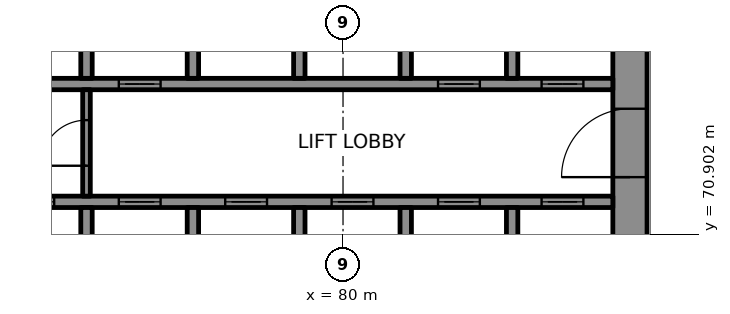
"""IFC4 building model, lengths in metres.
Left out: names, types, materials, properties, quantities, classifications, styles, units other than length and angle.
Written with IfcOpenShell. Run it as: python <this file> out.ifc"""

import sys

from ifc_helpers import new_model, si_unit, direction, frame, frame_2d, origin, place, context, subcontext, project, spatial, rectangle, extrude, element, fill, save


model = new_model("IFC4")
c1 = context("Model", 3, precision=1e-05, world=origin(), true_north=direction((0.0, 1.0)))
c2 = subcontext(c1, "Body", "Model", "MODEL_VIEW")
j1 = project(units=[si_unit("LENGTHUNIT", "METRE"), si_unit("PLANEANGLEUNIT", "RADIAN")], contexts=[c1])
p1 = place(None, origin())
s1 = spatial("IfcSite", under=j1, at=p1, CompositionType="ELEMENT")
p2 = place(p1, origin())
s2 = spatial("IfcBuilding", under=s1, at=p2, CompositionType="ELEMENT")
p3 = place(p2, frame((0.0, 0.0, 21.8)))
s3 = spatial("IfcBuildingStorey", under=s2, at=p3, CompositionType="ELEMENT", Elevation=21.8)
p4 = place(p3, frame((87.55, 66.9, 0.0), z_axis=(0.0, 0.0, 1.0), x_axis=(0.0, 1.0, 0.0)))
e1 = element("IfcWall", 1, at=p4, inside=s3, PredefinedType="SHEAR", context=c2, shape_type="SweptSolid", body=[
    extrude(rectangle(XDim=16.2, YDim=0.9, at=frame_2d((8.1, 0.0))), origin(), (0.0, 0.0, 1.0), 4.3),
])
p5 = place(p4, frame((5.5, 0.0, 0.0)))
e2 = element("IfcOpeningElement", 2, at=p5, cuts=e1, PredefinedType="OPENING", context=c2, shape_type="SweptSolid", body=[
    extrude(rectangle(XDim=1.8, YDim=2.1, at=frame_2d((0.9, 1.05))), frame((0.0, 0.46, 0.0), z_axis=(0.0, -1.0, 0.0), x_axis=(1.0, 0.0, 0.0)), (0.0, 0.0, 1.0), 0.92),
])
p6 = place(p4, frame((12.272, 0.0, 0.0)))
e3 = element("IfcOpeningElement", 3, at=p6, cuts=e1, PredefinedType="OPENING", context=c2, shape_type="SweptSolid", body=[
    extrude(rectangle(XDim=0.9, YDim=2.1, at=frame_2d((0.45, 1.05))), frame((0.0, 0.46, 0.0), z_axis=(0.0, -1.0, 0.0), x_axis=(1.0, 0.0, 0.0)), (0.0, 0.0, 1.0), 0.92),
])
p7 = place(p3, frame((70.3, 71.75, 0.0), z_axis=(0.0, 0.0, 1.0), x_axis=(1.0, 0.0, 0.0)))
e4 = element("IfcWall", 4, at=p7, inside=s3, PredefinedType="SHEAR", context=c2, shape_type="SweptSolid", body=[
    extrude(rectangle(XDim=16.8, YDim=0.3, at=frame_2d((8.4, 0.0))), origin(), (0.0, 0.0, 1.0), 4.3),
])
p8 = place(p7, frame((1.0, 0.0, 0.0)))
e5 = element("IfcOpeningElement", 5, at=p8, cuts=e4, PredefinedType="OPENING", context=c2, shape_type="SweptSolid", body=[
    extrude(rectangle(XDim=1.1, YDim=2.1, at=frame_2d((0.55, 1.05))), frame((0.0, 0.16, 0.0), z_axis=(0.0, -1.0, 0.0), x_axis=(1.0, 0.0, 0.0)), (0.0, 0.0, 1.0), 0.32),
])
p9 = place(p7, frame((3.8, 0.0, 0.0)))
e6 = element("IfcOpeningElement", 6, at=p9, cuts=e4, PredefinedType="OPENING", context=c2, shape_type="SweptSolid", body=[
    extrude(rectangle(XDim=1.1, YDim=2.1, at=frame_2d((0.55, 1.05))), frame((0.0, 0.16, 0.0), z_axis=(0.0, -1.0, 0.0), x_axis=(1.0, 0.0, 0.0)), (0.0, 0.0, 1.0), 0.32),
])
p10 = place(p7, frame((6.6, 0.0, 0.0)))
e7 = element("IfcOpeningElement", 7, at=p10, cuts=e4, PredefinedType="OPENING", context=c2, shape_type="SweptSolid", body=[
    extrude(rectangle(XDim=1.1, YDim=2.1, at=frame_2d((0.55, 1.05))), frame((0.0, 0.16, 0.0), z_axis=(0.0, -1.0, 0.0), x_axis=(1.0, 0.0, 0.0)), (0.0, 0.0, 1.0), 0.32),
])
p11 = place(p7, frame((9.4, 0.0, 0.0)))
e8 = element("IfcOpeningElement", 8, at=p11, cuts=e4, PredefinedType="OPENING", context=c2, shape_type="SweptSolid", body=[
    extrude(rectangle(XDim=1.1, YDim=2.1, at=frame_2d((0.55, 1.05))), frame((0.0, 0.16, 0.0), z_axis=(0.0, -1.0, 0.0), x_axis=(1.0, 0.0, 0.0)), (0.0, 0.0, 1.0), 0.32),
])
p12 = place(p7, frame((12.2, 0.0, 0.0)))
e9 = element("IfcOpeningElement", 9, at=p12, cuts=e4, PredefinedType="OPENING", context=c2, shape_type="SweptSolid", body=[
    extrude(rectangle(XDim=1.1, YDim=2.1, at=frame_2d((0.55, 1.05))), frame((0.0, 0.16, 0.0), z_axis=(0.0, -1.0, 0.0), x_axis=(1.0, 0.0, 0.0)), (0.0, 0.0, 1.0), 0.32),
])
p13 = place(p7, frame((14.925, 0.0, 0.0)))
e10 = element("IfcOpeningElement", 10, at=p13, cuts=e4, PredefinedType="OPENING", context=c2, shape_type="SweptSolid", body=[
    extrude(rectangle(XDim=1.1, YDim=2.1, at=frame_2d((0.55, 1.05))), frame((0.0, 0.16, 0.0), z_axis=(0.0, -1.0, 0.0), x_axis=(1.0, 0.0, 0.0)), (0.0, 0.0, 1.0), 0.32),
])
p14 = place(p3, frame((70.3, 74.85, 0.0), z_axis=(0.0, 0.0, 1.0), x_axis=(1.0, 0.0, 0.0)))
e11 = element("IfcWall", 11, at=p14, inside=s3, PredefinedType="SHEAR", context=c2, shape_type="SweptSolid", body=[
    extrude(rectangle(XDim=16.8, YDim=0.3, at=frame_2d((8.4, 0.0))), origin(), (0.0, 0.0, 1.0), 4.3),
])
p15 = place(p14, frame((3.8, 0.0, 0.0)))
e12 = element("IfcOpeningElement", 12, at=p15, cuts=e11, PredefinedType="OPENING", context=c2, shape_type="SweptSolid", body=[
    extrude(rectangle(XDim=1.1, YDim=2.1, at=frame_2d((0.55, 1.05))), frame((0.0, 0.16, 0.0), z_axis=(0.0, -1.0, 0.0), x_axis=(1.0, 0.0, 0.0)), (0.0, 0.0, 1.0), 0.32),
])
p16 = place(p14, frame((12.2, 0.0, 0.0)))
e13 = element("IfcOpeningElement", 13, at=p16, cuts=e11, PredefinedType="OPENING", context=c2, shape_type="SweptSolid", body=[
    extrude(rectangle(XDim=1.1, YDim=2.1, at=frame_2d((0.55, 1.05))), frame((0.0, 0.16, 0.0), z_axis=(0.0, -1.0, 0.0), x_axis=(1.0, 0.0, 0.0)), (0.0, 0.0, 1.0), 0.32),
])
p17 = place(p14, frame((14.925, 0.0, 0.0)))
e14 = element("IfcOpeningElement", 14, at=p17, cuts=e11, PredefinedType="OPENING", context=c2, shape_type="SweptSolid", body=[
    extrude(rectangle(XDim=1.1, YDim=2.1, at=frame_2d((0.55, 1.05))), frame((0.0, 0.16, 0.0), z_axis=(0.0, -1.0, 0.0), x_axis=(1.0, 0.0, 0.0)), (0.0, 0.0, 1.0), 0.32),
])
for number, where, z_axis, x_axis in (
    (15, (73.25, 69.0, 0.0), (0.0, 0.0, 1.0), (0.0, 1.0, 0.0)),
    (16, (73.25, 75.0, 0.0), (0.0, 0.0, 1.0), (0.0, 1.0, 0.0)),
    (17, (76.05, 69.0, 0.0), (0.0, 0.0, 1.0), (0.0, 1.0, 0.0)),
    (18, (76.05, 75.0, 0.0), (0.0, 0.0, 1.0), (0.0, 1.0, 0.0)),
    (19, (78.85, 69.0, 0.0), (0.0, 0.0, 1.0), (0.0, 1.0, 0.0)),
    (20, (78.85, 75.0, 0.0), (0.0, 0.0, 1.0), (0.0, 1.0, 0.0)),
    (21, (81.65, 69.0, 0.0), (0.0, 0.0, 1.0), (0.0, 1.0, 0.0)),
    (22, (81.65, 75.0, 0.0), (0.0, 0.0, 1.0), (0.0, 1.0, 0.0)),
    (23, (84.45, 69.0, 0.0), (0.0, 0.0, 1.0), (0.0, 1.0, 0.0)),
    (24, (84.45, 75.0, 0.0), (0.0, 0.0, 1.0), (0.0, 1.0, 0.0)),
):
    element("IfcWall", number, at=place(p3, frame(where, z_axis=z_axis, x_axis=x_axis)), inside=s3, PredefinedType="SHEAR", context=c2, shape_type="SweptSolid", body=[
        extrude(rectangle(XDim=2.6, YDim=0.3, at=frame_2d((1.3, 0.0))), origin(), (0.0, 0.0, 1.0), 4.3),
    ])
p18 = place(p3, frame((73.25, 71.9, 0.0), z_axis=(0.0, 0.0, 1.0), x_axis=(0.0, 1.0, 0.0)))
e25 = element("IfcWall", 25, at=p18, inside=s3, PredefinedType="PARTITIONING", context=c2, shape_type="SweptSolid", body=[
    extrude(rectangle(XDim=2.8, YDim=0.2, at=frame_2d((1.4, 0.0))), origin(), (0.0, 0.0, 1.0), 4.3),
])
p19 = place(p18, frame((0.8, 0.0, 0.0)))
e26 = element("IfcOpeningElement", 26, at=p19, cuts=e25, PredefinedType="OPENING", context=c2, shape_type="SweptSolid", body=[
    extrude(rectangle(XDim=1.2, YDim=2.1, at=frame_2d((0.6, 1.05))), frame((0.0, 0.11, 0.0), z_axis=(0.0, -1.0, 0.0), x_axis=(1.0, 0.0, 0.0)), (0.0, 0.0, 1.0), 0.22),
])
p20 = place(p3, frame((107.106, 62.36, 0.0), z_axis=(0.0, 0.0, 1.0), x_axis=(-0.49999992739, 0.866025445706, 0.0)))
e27 = element("IfcWall", 27, at=p20, inside=s3, PredefinedType="SOLIDWALL", context=c2, shape_type="SweptSolid", body=[
    extrude(rectangle(XDim=54.0, YDim=0.4, at=frame_2d((27.0, 0.0))), origin(), (0.0, 0.0, 1.0), 4.3),
])
p21 = place(p3, frame((112.496, 65.725, 0.0), z_axis=(0.0, 0.0, 1.0), x_axis=(-0.499998673217, 0.866026169802, 0.0)))
e28 = element("IfcWall", 28, at=p21, inside=s3, PredefinedType="PARTITIONING", context=c2, shape_type="SweptSolid", body=[
    extrude(rectangle(XDim=53.48, YDim=0.2, at=frame_2d((26.74, 0.0))), origin(), (0.0, 0.0, 1.0), 4.3),
])
p22 = place(p21, frame((13.08, 0.0, 0.0)))
e29 = element("IfcOpeningElement", 29, at=p22, cuts=e28, PredefinedType="OPENING", context=c2, shape_type="SweptSolid", body=[
    extrude(rectangle(XDim=1.0, YDim=2.1, at=frame_2d((0.5, 1.05))), frame((0.0, 0.11, 0.0), z_axis=(0.0, -1.0, 0.0), x_axis=(1.0, 0.0, 0.0)), (0.0, 0.0, 1.0), 0.22),
])
p23 = place(p21, frame((26.28, 0.0, 0.0)))
e30 = element("IfcOpeningElement", 30, at=p23, cuts=e28, PredefinedType="OPENING", context=c2, shape_type="SweptSolid", body=[
    extrude(rectangle(XDim=1.0, YDim=2.1, at=frame_2d((0.5, 1.05))), frame((0.0, 0.11, 0.0), z_axis=(0.0, -1.0, 0.0), x_axis=(1.0, 0.0, 0.0)), (0.0, 0.0, 1.0), 0.22),
])
p24 = place(p21, frame((43.88, 0.0, 0.0)))
e31 = element("IfcOpeningElement", 31, at=p24, cuts=e28, PredefinedType="OPENING", context=c2, shape_type="SweptSolid", body=[
    extrude(rectangle(XDim=1.0, YDim=2.1, at=frame_2d((0.5, 1.05))), frame((0.0, 0.11, 0.0), z_axis=(0.0, -1.0, 0.0), x_axis=(1.0, 0.0, 0.0)), (0.0, 0.0, 1.0), 0.22),
])
p25 = place(p21, frame((50.58, 0.0, 0.0)))
e32 = element("IfcOpeningElement", 32, at=p25, cuts=e28, PredefinedType="OPENING", context=c2, shape_type="SweptSolid", body=[
    extrude(rectangle(XDim=1.0, YDim=2.1, at=frame_2d((0.5, 1.05))), frame((0.0, 0.11, 0.0), z_axis=(0.0, -1.0, 0.0), x_axis=(1.0, 0.0, 0.0)), (0.0, 0.0, 1.0), 0.22),
])
p26 = place(p8, origin())
e33 = element("IfcDoor", 33, at=p26, inside=s3, OperationType="DOUBLE_DOOR_SLIDING", PredefinedType="DOOR", context=c2, shape_type="SweptSolid", body=[
    extrude(rectangle(XDim=1.1, YDim=2.1, at=frame_2d((0.55, 1.05))), frame((0.0, 0.025, 0.0), z_axis=(0.0, -1.0, 0.0), x_axis=(1.0, 0.0, 0.0)), (0.0, 0.0, 1.0), 0.05),
])
fill(e5, e33)
p27 = place(p9, origin())
e34 = element("IfcDoor", 34, at=p27, inside=s3, OperationType="DOUBLE_DOOR_SLIDING", PredefinedType="DOOR", context=c2, shape_type="SweptSolid", body=[
    extrude(rectangle(XDim=1.1, YDim=2.1, at=frame_2d((0.55, 1.05))), frame((0.0, 0.025, 0.0), z_axis=(0.0, -1.0, 0.0), x_axis=(1.0, 0.0, 0.0)), (0.0, 0.0, 1.0), 0.05),
])
fill(e6, e34)
p28 = place(p10, origin())
e35 = element("IfcDoor", 35, at=p28, inside=s3, OperationType="DOUBLE_DOOR_SLIDING", PredefinedType="DOOR", context=c2, shape_type="SweptSolid", body=[
    extrude(rectangle(XDim=1.1, YDim=2.1, at=frame_2d((0.55, 1.05))), frame((0.0, 0.025, 0.0), z_axis=(0.0, -1.0, 0.0), x_axis=(1.0, 0.0, 0.0)), (0.0, 0.0, 1.0), 0.05),
])
fill(e7, e35)
p29 = place(p11, origin())
e36 = element("IfcDoor", 36, at=p29, inside=s3, OperationType="DOUBLE_DOOR_SLIDING", PredefinedType="DOOR", context=c2, shape_type="SweptSolid", body=[
    extrude(rectangle(XDim=1.1, YDim=2.1, at=frame_2d((0.55, 1.05))), frame((0.0, 0.025, 0.0), z_axis=(0.0, -1.0, 0.0), x_axis=(1.0, 0.0, 0.0)), (0.0, 0.0, 1.0), 0.05),
])
fill(e8, e36)
p30 = place(p12, origin())
e37 = element("IfcDoor", 37, at=p30, inside=s3, OperationType="DOUBLE_DOOR_SLIDING", PredefinedType="DOOR", context=c2, shape_type="SweptSolid", body=[
    extrude(rectangle(XDim=1.1, YDim=2.1, at=frame_2d((0.55, 1.05))), frame((0.0, 0.025, 0.0), z_axis=(0.0, -1.0, 0.0), x_axis=(1.0, 0.0, 0.0)), (0.0, 0.0, 1.0), 0.05),
])
fill(e9, e37)
p31 = place(p13, origin())
e38 = element("IfcDoor", 38, at=p31, inside=s3, OperationType="DOUBLE_DOOR_SLIDING", PredefinedType="DOOR", context=c2, shape_type="SweptSolid", body=[
    extrude(rectangle(XDim=1.1, YDim=2.1, at=frame_2d((0.55, 1.05))), frame((0.0, 0.025, 0.0), z_axis=(0.0, -1.0, 0.0), x_axis=(1.0, 0.0, 0.0)), (0.0, 0.0, 1.0), 0.05),
])
fill(e10, e38)
p32 = place(p15, origin())
e39 = element("IfcDoor", 39, at=p32, inside=s3, OperationType="DOUBLE_DOOR_SLIDING", PredefinedType="DOOR", context=c2, shape_type="SweptSolid", body=[
    extrude(rectangle(XDim=1.1, YDim=2.1, at=frame_2d((0.55, 1.05))), frame((0.0, 0.025, 0.0), z_axis=(0.0, -1.0, 0.0), x_axis=(1.0, 0.0, 0.0)), (0.0, 0.0, 1.0), 0.05),
])
fill(e12, e39)
p33 = place(p16, origin())
e40 = element("IfcDoor", 40, at=p33, inside=s3, OperationType="DOUBLE_DOOR_SLIDING", PredefinedType="DOOR", context=c2, shape_type="SweptSolid", body=[
    extrude(rectangle(XDim=1.1, YDim=2.1, at=frame_2d((0.55, 1.05))), frame((0.0, 0.025, 0.0), z_axis=(0.0, -1.0, 0.0), x_axis=(1.0, 0.0, 0.0)), (0.0, 0.0, 1.0), 0.05),
])
fill(e13, e40)
p34 = place(p17, origin())
e41 = element("IfcDoor", 41, at=p34, inside=s3, OperationType="DOUBLE_DOOR_SLIDING", PredefinedType="DOOR", context=c2, shape_type="SweptSolid", body=[
    extrude(rectangle(XDim=1.1, YDim=2.1, at=frame_2d((0.55, 1.05))), frame((0.0, 0.025, 0.0), z_axis=(0.0, -1.0, 0.0), x_axis=(1.0, 0.0, 0.0)), (0.0, 0.0, 1.0), 0.05),
])
fill(e14, e41)
p35 = place(p19, origin())
e42 = element("IfcDoor", 42, at=p35, inside=s3, OperationType="SINGLE_SWING_LEFT", PredefinedType="DOOR", context=c2, shape_type="SweptSolid", body=[
    extrude(rectangle(XDim=1.2, YDim=2.1, at=frame_2d((0.6, 1.05))), frame((0.0, 0.025, 0.0), z_axis=(0.0, -1.0, 0.0), x_axis=(1.0, 0.0, 0.0)), (0.0, 0.0, 1.0), 0.05),
])
fill(e26, e42)
p36 = place(p5, origin())
e43 = element("IfcDoor", 43, at=p36, inside=s3, OperationType="SINGLE_SWING_RIGHT", PredefinedType="DOOR", context=c2, shape_type="SweptSolid", body=[
    extrude(rectangle(XDim=1.8, YDim=2.1, at=frame_2d((0.9, 1.05))), frame((0.0, 0.17, 0.0), z_axis=(0.0, -1.0, 0.0), x_axis=(1.0, 0.0, 0.0)), (0.0, 0.0, 1.0), 0.34),
])
fill(e2, e43)
save(model, sys.argv[1])
